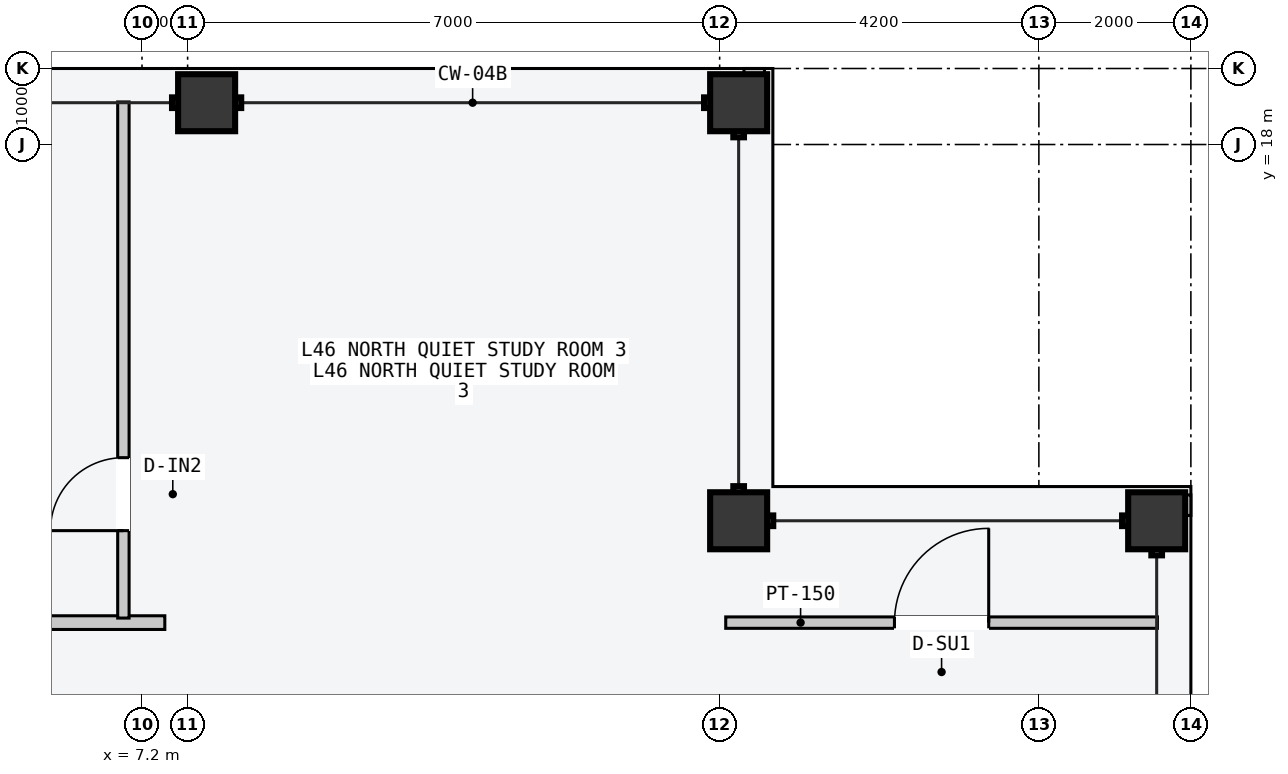
"""IFC4 building model, lengths in metres.
Left out: names, types, materials, properties, quantities, classifications, styles, units other than length and angle.
Written with IfcOpenShell. Run it as: python <this file> out.ifc"""

import sys

from ifc_helpers import new_model, si_unit, direction, frame, frame_2d, origin, origin_2d, place, context, subcontext, project, spatial, rectangle, hollow_rectangle, extrude, element, fill, save


model = new_model("IFC4")
c1 = context("Model", 3, precision=1e-05, world=origin(), true_north=direction((0.0, 1.0)))
c2 = subcontext(c1, "Body", "Model", "MODEL_VIEW")
j1 = project(units=[si_unit("LENGTHUNIT", "METRE"), si_unit("PLANEANGLEUNIT", "RADIAN")], contexts=[c1])
p1 = place(None, origin())
s1 = spatial("IfcSite", under=j1, at=p1, CompositionType="ELEMENT")
p2 = place(p1, origin())
s2 = spatial("IfcBuilding", under=s1, at=p2, CompositionType="ELEMENT")
p3 = place(p2, frame((0.0, 0.0, 176.7)))
s3 = spatial("IfcBuildingStorey", under=s2, at=p3, CompositionType="ELEMENT", Elevation=176.7)
for number, where, z_axis, x_axis in (
    (1, (8.05, 18.55, 0.0), (0.0, 0.0, 1.0), (1.0, 0.0, 0.0)),
    (2, (15.05, 18.55, 0.0), (0.0, 0.0, 1.0), (1.0, 0.0, 0.0)),
    (3, (20.55, 13.05, 0.0), (0.0, 0.0, 1.0), (0.0, 1.0, 0.0)),
    (4, (15.05, 13.05, 0.0), (0.0, 0.0, 1.0), (1.0, 0.0, 0.0)),
):
    element("IfcColumn", number, at=place(p3, frame(where, z_axis=z_axis, x_axis=x_axis)), inside=s3, PredefinedType="COLUMN", context=c2, shape_type="SweptSolid", body=[
        extrude(hollow_rectangle(XDim=0.75, YDim=0.75, WallThickness=0.032, at=origin_2d()), origin(), (0.0, 0.0, 1.0), 3.6),
    ])
for number, where, z_axis, x_axis in (
    (5, (15.12, 18.89, 0.0), (0.0, 0.0, 1.0), (1.0, 0.0, 0.0)),
    (6, (20.89, 13.12, 0.0), (0.0, 0.0, 1.0), (0.0, 1.0, 0.0)),
):
    element("IfcWall", number, at=place(p3, frame(where, z_axis=z_axis, x_axis=x_axis)), inside=s3, PredefinedType="PARAPET", context=c2, shape_type="SweptSolid", body=[
        extrude(rectangle(XDim=0.27, YDim=0.22, at=frame_2d((0.135, 0.0))), origin(), (0.0, 0.0, 1.0), 1.2),
    ])
p4 = place(p3, frame((1.26, 11.71, 0.0), z_axis=(0.0, 0.0, 1.0), x_axis=(1.0, 0.0, 0.0)))
e7 = element("IfcWall", 7, at=p4, inside=s3, PredefinedType="PARTITIONING", context=c2, shape_type="SweptSolid", body=[
    extrude(rectangle(XDim=6.24, YDim=0.18, at=frame_2d((3.12, 0.0))), origin(), (0.0, 0.0, 1.0), 3.4),
])
p5 = place(p3, frame((6.955, 11.77, 0.0), z_axis=(0.0, 0.0, 1.0), x_axis=(0.0, 1.0, 0.0)))
e8 = element("IfcWall", 8, at=p5, inside=s3, PredefinedType="PARTITIONING", context=c2, shape_type="SweptSolid", body=[
    extrude(rectangle(XDim=6.79, YDim=0.15, at=frame_2d((3.395, 0.0))), origin(), (0.0, 0.0, 1.0), 3.4),
])
p6 = place(p5, frame((1.15, 0.0, 0.0)))
e9 = element("IfcOpeningElement", 9, at=p6, cuts=e8, PredefinedType="OPENING", context=c2, shape_type="SweptSolid", body=[
    extrude(rectangle(XDim=0.96, YDim=2.18, at=frame_2d((0.48, 1.09))), frame((0.0, 0.085, 0.0), z_axis=(0.0, -1.0, 0.0), x_axis=(1.0, 0.0, 0.0)), (0.0, 0.0, 1.0), 0.17),
])
p7 = place(p3, frame((14.88, 11.71, 0.0), z_axis=(0.0, 0.0, 1.0), x_axis=(1.0, 0.0, 0.0)))
e10 = element("IfcWall", 10, at=p7, inside=s3, PredefinedType="PARTITIONING", context=c2, shape_type="SweptSolid", body=[
    extrude(rectangle(XDim=5.68, YDim=0.15, at=frame_2d((2.84, 0.0))), origin(), (0.0, 0.0, 1.0), 3.4),
])
p8 = place(p7, frame((2.22, 0.0, 0.0)))
e11 = element("IfcOpeningElement", 11, at=p8, cuts=e10, PredefinedType="OPENING", context=c2, shape_type="SweptSolid", body=[
    extrude(rectangle(XDim=1.24, YDim=2.24, at=frame_2d((0.62, 1.12))), frame((0.0, 0.085, 0.0), z_axis=(0.0, -1.0, 0.0), x_axis=(1.0, 0.0, 0.0)), (0.0, 0.0, 1.0), 0.17),
])
p9 = place(p6, origin())
e12 = element("IfcDoor", 12, at=p9, inside=s3, OperationType="SINGLE_SWING_LEFT", PredefinedType="DOOR", context=c2, shape_type="SweptSolid", body=[
    extrude(rectangle(XDim=0.96, YDim=2.18, at=frame_2d((0.48, 1.09))), frame((0.0, 0.025, 0.0), z_axis=(0.0, -1.0, 0.0), x_axis=(1.0, 0.0, 0.0)), (0.0, 0.0, 1.0), 0.05),
])
fill(e9, e12)
p10 = place(p8, origin())
e13 = element("IfcDoor", 13, at=p10, inside=s3, OperationType="SINGLE_SWING_RIGHT", PredefinedType="DOOR", context=c2, shape_type="SweptSolid", body=[
    extrude(rectangle(XDim=1.24, YDim=2.24, at=frame_2d((0.62, 1.12))), frame((0.0, 0.025, 0.0), z_axis=(0.0, -1.0, 0.0), x_axis=(1.0, 0.0, 0.0)), (0.0, 0.0, 1.0), 0.05),
])
fill(e11, e13)
save(model, sys.argv[1])
